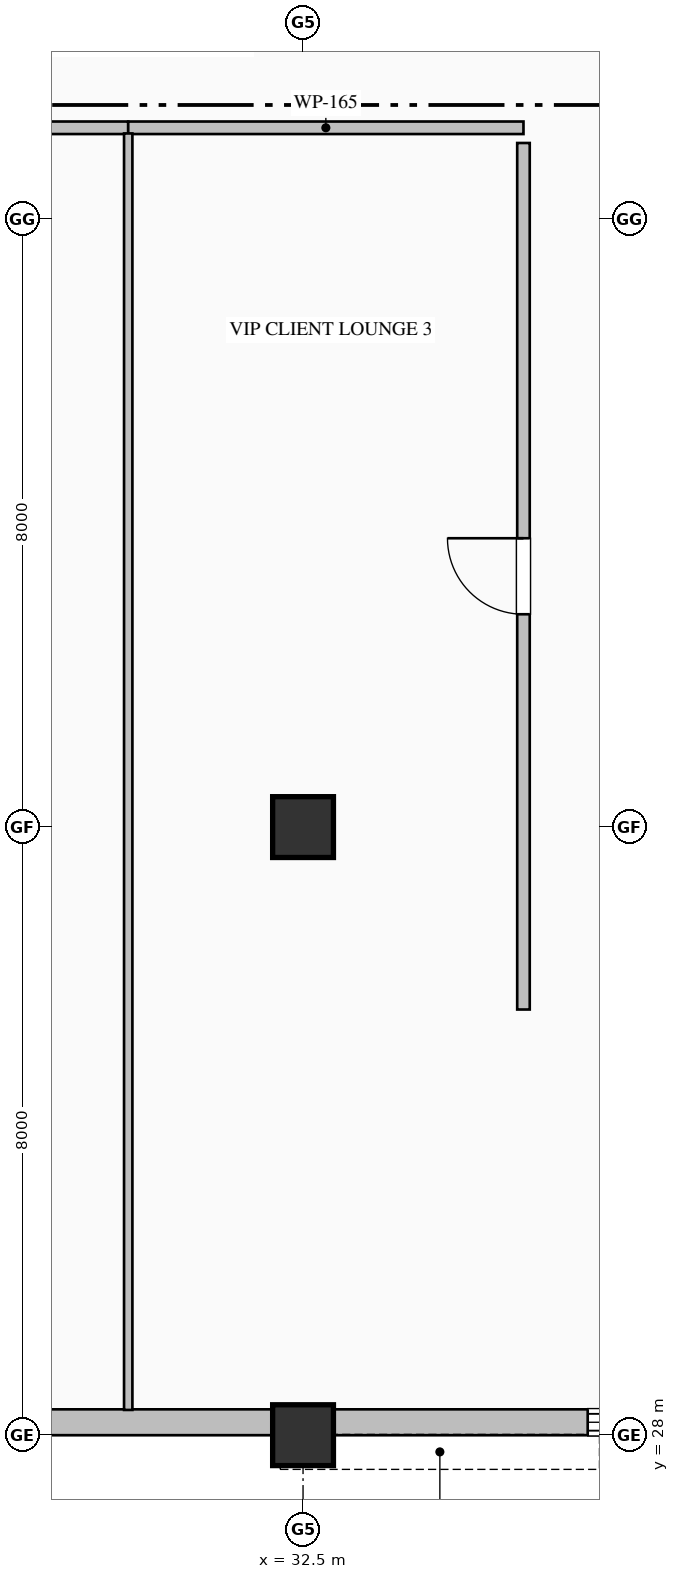
"""IFC4 building model, lengths in metres.
Left out: names, types, materials, properties, quantities, classifications, styles, units other than length and angle.
Written with IfcOpenShell. Run it as: python <this file> out.ifc"""

import sys

from ifc_helpers import new_model, si_unit, direction, frame, frame_2d, origin, origin_2d, place, context, subcontext, project, spatial, rectangle, hollow_rectangle, extrude, element, fill, save


model = new_model("IFC4")
c1 = context("Model", 3, precision=1e-05, world=origin(), true_north=direction((0.0, 1.0)))
c2 = subcontext(c1, "Body", "Model", "MODEL_VIEW")
j1 = project(units=[si_unit("LENGTHUNIT", "METRE"), si_unit("PLANEANGLEUNIT", "RADIAN")], contexts=[c1])
p1 = place(None, origin())
s1 = spatial("IfcSite", under=j1, at=p1, CompositionType="ELEMENT")
p2 = place(p1, origin())
s2 = spatial("IfcBuilding", under=s1, at=p2, CompositionType="ELEMENT")
p3 = place(p2, frame((0.0, 0.0, 351.2)))
s3 = spatial("IfcBuildingStorey", under=s2, at=p3, CompositionType="ELEMENT", Elevation=351.2)
for number, where, z_axis, x_axis in (
    (1, (32.5, 28.0, 0.0), (0.0, 0.0, 1.0), (1.0, 0.0, 0.0)),
    (2, (32.5, 36.0, 0.0), (0.0, 0.0, 1.0), (1.0, 0.0, 0.0)),
):
    element("IfcColumn", number, at=place(p3, frame(where, z_axis=z_axis, x_axis=x_axis)), inside=s3, PredefinedType="COLUMN", context=c2, shape_type="SweptSolid", body=[
        extrude(hollow_rectangle(XDim=0.8, YDim=0.8, WallThickness=0.032, at=origin_2d()), origin(), (0.0, 0.0, 1.0), 4.0),
    ])
p4 = place(p3, frame((40.52, 28.17, 0.0), z_axis=(0.0, 0.0, 1.0), x_axis=(-1.0, 0.0, 0.0)))
e3 = element("IfcWall", 3, at=p4, inside=s3, PredefinedType="SOLIDWALL", context=c2, shape_type="SweptSolid", body=[
    extrude(rectangle(XDim=20.02, YDim=0.34, at=frame_2d((10.01, 0.0))), origin(), (0.0, 0.0, 1.0), 3.185),
])
p5 = place(p4, frame((2.925, 0.0, 0.9)))
e4 = element("IfcOpeningElement", 4, at=p5, cuts=e3, PredefinedType="OPENING", context=c2, shape_type="SweptSolid", body=[
    extrude(rectangle(XDim=1.35, YDim=1.85, at=frame_2d((0.675, 0.925))), frame((0.0, 0.18, 0.0), z_axis=(0.0, -1.0, 0.0), x_axis=(1.0, 0.0, 0.0)), (0.0, 0.0, 1.0), 0.36),
])
p6 = place(p4, frame((13.725, 0.0, 0.9)))
e5 = element("IfcOpeningElement", 5, at=p6, cuts=e3, PredefinedType="OPENING", context=c2, shape_type="SweptSolid", body=[
    extrude(rectangle(XDim=1.35, YDim=1.85, at=frame_2d((0.675, 0.925))), frame((0.0, 0.18, 0.0), z_axis=(0.0, -1.0, 0.0), x_axis=(1.0, 0.0, 0.0)), (0.0, 0.0, 1.0), 0.36),
])
p7 = place(p3, frame((30.2, 45.2, 0.0), z_axis=(0.0, 0.0, 1.0), x_axis=(-1.0, 0.0, 0.0)))
e6 = element("IfcWall", 6, at=p7, inside=s3, PredefinedType="PARTITIONING", context=c2, shape_type="SweptSolid", body=[
    extrude(rectangle(XDim=7.2, YDim=0.165, at=frame_2d((3.6, 0.0))), origin(), (0.0, 0.0, 1.0), 3.785),
])
p8 = place(p7, frame((3.1, 0.0, 0.0)))
e7 = element("IfcOpeningElement", 7, at=p8, cuts=e6, PredefinedType="OPENING", context=c2, shape_type="SweptSolid", body=[
    extrude(rectangle(XDim=1.0, YDim=2.15, at=frame_2d((0.5, 1.075))), frame((0.0, 0.093, 0.0), z_axis=(0.0, -1.0, 0.0), x_axis=(1.0, 0.0, 0.0)), (0.0, 0.0, 1.0), 0.185),
])
p9 = place(p3, frame((35.4, 45.2, 0.0), z_axis=(0.0, 0.0, 1.0), x_axis=(-1.0, 0.0, 0.0)))
e8 = element("IfcWall", 8, at=p9, inside=s3, PredefinedType="PARTITIONING", context=c2, shape_type="SweptSolid", body=[
    extrude(rectangle(XDim=5.2, YDim=0.165, at=frame_2d((2.6, 0.0))), origin(), (0.0, 0.0, 1.0), 3.785),
])
p10 = place(p3, frame((35.4, 33.6, 0.0), z_axis=(0.0, 0.0, 1.0), x_axis=(0.0, 1.0, 0.0)))
e9 = element("IfcWall", 9, at=p10, inside=s3, PredefinedType="PARTITIONING", context=c2, shape_type="SweptSolid", body=[
    extrude(rectangle(XDim=11.4, YDim=0.165, at=frame_2d((5.7, 0.0))), origin(), (0.0, 0.0, 1.0), 3.785),
])
p11 = place(p10, frame((5.2, 0.0, 0.0)))
e10 = element("IfcOpeningElement", 10, at=p11, cuts=e9, PredefinedType="OPENING", context=c2, shape_type="SweptSolid", body=[
    extrude(rectangle(XDim=1.0, YDim=2.15, at=frame_2d((0.5, 1.075))), frame((0.0, 0.093, 0.0), z_axis=(0.0, -1.0, 0.0), x_axis=(1.0, 0.0, 0.0)), (0.0, 0.0, 1.0), 0.185),
])
p12 = place(p3, frame((30.2, 45.125, 0.0), z_axis=(0.0, 0.0, 1.0), x_axis=(0.0, -1.0, 0.0)))
e11 = element("IfcWall", 11, at=p12, inside=s3, PredefinedType="MOVABLE", context=c2, shape_type="SweptSolid", body=[
    extrude(rectangle(XDim=16.793, YDim=0.11, at=frame_2d((8.397, 0.0))), origin(), (0.0, 0.0, 1.0), 3.785),
])
p13 = place(p5, origin())
e12 = element("IfcWindow", 12, at=p13, inside=s3, PartitioningType="DOUBLE_PANEL_VERTICAL", PredefinedType="WINDOW", context=c2, shape_type="SweptSolid", body=[
    extrude(rectangle(XDim=1.35, YDim=1.85, at=frame_2d((0.675, 0.925))), frame((0.0, 0.15, 0.0), z_axis=(0.0, -1.0, 0.0), x_axis=(1.0, 0.0, 0.0)), (0.0, 0.0, 1.0), 0.06),
])
fill(e4, e12)
p14 = place(p11, origin())
e13 = element("IfcDoor", 13, at=p14, inside=s3, OperationType="SINGLE_SWING_RIGHT", PredefinedType="DOOR", context=c2, shape_type="SweptSolid", body=[
    extrude(rectangle(XDim=1.0, YDim=2.15, at=frame_2d((0.5, 1.075))), frame((0.0, 0.025, 0.0), z_axis=(0.0, -1.0, 0.0), x_axis=(1.0, 0.0, 0.0)), (0.0, 0.0, 1.0), 0.05),
])
fill(e10, e13)
save(model, sys.argv[1])
